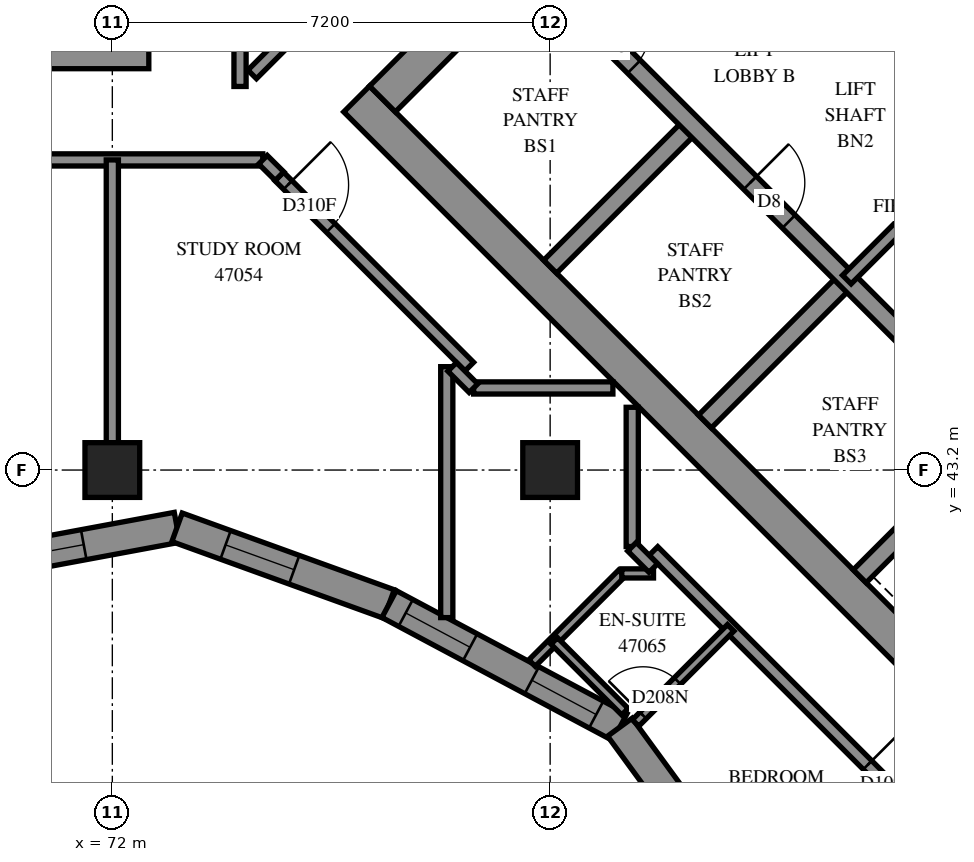
"""IFC4 building model, lengths in metres.
Left out: names, types, materials, properties, quantities, classifications, styles, units other than length and angle.
Written with IfcOpenShell. Run it as: python <this file> out.ifc"""

import sys

from ifc_helpers import new_model, si_unit, direction, frame, frame_2d, origin, origin_2d, place, context, subcontext, project, spatial, polyline, rectangle, outline, extrude, element, fill, save


model = new_model("IFC4")
c1 = context("Model", 3, precision=1e-05, world=origin(), true_north=direction((0.0, 1.0)))
c2 = subcontext(c1, "Body", "Model", "MODEL_VIEW")
j1 = project(units=[si_unit("LENGTHUNIT", "METRE"), si_unit("PLANEANGLEUNIT", "RADIAN")], contexts=[c1])
p1 = place(None, origin())
s1 = spatial("IfcSite", under=j1, at=p1, CompositionType="ELEMENT")
p2 = place(p1, origin())
s2 = spatial("IfcBuilding", under=s1, at=p2, CompositionType="ELEMENT")
p3 = place(p2, frame((0.0, 0.0, 172.8)))
s3 = spatial("IfcBuildingStorey", under=s2, at=p3, CompositionType="ELEMENT", Elevation=172.8)
for number, where, z_axis, x_axis in (
    (1, (72.0, 43.2, 0.0), (0.0, 0.0, 1.0), (1.0, 0.0, 0.0)),
    (2, (79.2, 43.2, 0.0), (0.0, 0.0, 1.0), (1.0, 0.0, 0.0)),
):
    element("IfcColumn", number, at=place(p3, frame(where, z_axis=z_axis, x_axis=x_axis)), inside=s3, PredefinedType="COLUMN", context=c2, shape_type="SweptSolid", body=[
        extrude(rectangle(XDim=0.9, YDim=0.9, at=origin_2d()), origin(), (0.0, 0.0, 1.0), 3.1),
    ])
for number, where, z_axis, x_axis in (
    (3, (57.0, 50.1, -0.3), (0.0, 0.0, 1.0), (1.0, 0.0, 0.0)),
    (4, (76.018, 49.302, -0.3), (0.0, 0.0, 1.0), (0.707, -0.707, 0.0)),
):
    element("IfcWall", number, at=place(p3, frame(where, z_axis=z_axis, x_axis=x_axis)), inside=s3, PredefinedType="SHEAR", context=c2, shape_type="SweptSolid", body=[
        extrude(rectangle(XDim=15.6, YDim=0.6, at=frame_2d((7.8, 0.0))), origin(), (0.0, 0.0, 1.0), 2.7),
    ])
p4 = place(p3, frame((76.442, 49.302, -0.3), z_axis=(0.0, 0.0, 1.0), x_axis=(0.7071067812, 0.7071067812, 0.0)))
e5 = element("IfcWall", 5, at=p4, inside=s3, PredefinedType="SHEAR", context=c2, shape_type="SweptSolid", body=[
    extrude(rectangle(XDim=14.4, YDim=0.6, at=frame_2d((7.2, 0.0))), origin(), (0.0, 0.0, 1.0), 2.7),
])
p5 = place(p4, frame((4.55, 0.0, 0.3)))
e6 = element("IfcOpeningElement", 6, at=p5, cuts=e5, PredefinedType="OPENING", context=c2, shape_type="SweptSolid", body=[
    extrude(rectangle(XDim=1.1, YDim=2.1, at=frame_2d((0.55, 1.05))), frame((0.0, 0.31, 0.0), z_axis=(0.0, -1.0, 0.0), x_axis=(1.0, 0.0, 0.0)), (0.0, 0.0, 1.0), 0.62),
])
p6 = place(p4, frame((11.35, 0.0, 0.3)))
e7 = element("IfcOpeningElement", 7, at=p6, cuts=e5, PredefinedType="OPENING", context=c2, shape_type="SweptSolid", body=[
    extrude(rectangle(XDim=1.1, YDim=2.1, at=frame_2d((0.55, 1.05))), frame((0.0, 0.31, 0.0), z_axis=(0.0, -1.0, 0.0), x_axis=(1.0, 0.0, 0.0)), (0.0, 0.0, 1.0), 0.62),
])
p7 = place(p3, frame((79.2, 46.544, 0.0), z_axis=(0.0, 0.0, 1.0), x_axis=(0.7071219326, 0.7070916295, 0.0)))
e8 = element("IfcWall", 8, at=p7, inside=s3, PredefinedType="SOLIDWALL", context=c2, shape_type="SweptSolid", body=[
    extrude(rectangle(XDim=3.3, YDim=0.3, at=frame_2d((1.65, 0.0))), origin(), (0.0, 0.0, 1.0), 3.1),
])
for number, where, z_axis, x_axis in (
    (9, (81.746, 43.999, 0.0), (0.0, 0.0, 1.0), (0.707, 0.707, 0.0)),
    (10, (84.291, 41.453, 0.0), (0.0, 0.0, 1.0), (0.707, 0.707, 0.0)),
):
    element("IfcWall", number, at=place(p3, frame(where, z_axis=z_axis, x_axis=x_axis)), inside=s3, PredefinedType="SOLIDWALL", context=c2, shape_type="SweptSolid", body=[
        extrude(rectangle(XDim=3.3, YDim=0.3, at=frame_2d((1.65, 0.0))), origin(), (0.0, 0.0, 1.0), 3.1),
    ])
p8 = place(p3, frame((78.988, 51.423, 0.0), z_axis=(0.0, 0.0, 1.0), x_axis=(0.7071067812, -0.7071067812, 0.0)))
e11 = element("IfcWall", 11, at=p8, inside=s3, PredefinedType="SOLIDWALL", context=c2, shape_type="SweptSolid", body=[
    extrude(rectangle(XDim=14.4, YDim=0.3, at=frame_2d((7.2, 0.0))), origin(), (0.0, 0.0, 1.0), 3.1),
])
p9 = place(p8, frame((1.35, 0.0, 0.0)))
e12 = element("IfcOpeningElement", 12, at=p9, cuts=e11, PredefinedType="OPENING", context=c2, shape_type="SweptSolid", body=[
    extrude(rectangle(XDim=0.9, YDim=2.1, at=frame_2d((0.45, 1.05))), frame((0.0, 0.16, 0.0), z_axis=(0.0, -1.0, 0.0), x_axis=(1.0, 0.0, 0.0)), (0.0, 0.0, 1.0), 0.32),
])
p10 = place(p8, frame((4.95, 0.0, 0.0)))
e13 = element("IfcOpeningElement", 13, at=p10, cuts=e11, PredefinedType="OPENING", context=c2, shape_type="SweptSolid", body=[
    extrude(rectangle(XDim=0.9, YDim=2.1, at=frame_2d((0.45, 1.05))), frame((0.0, 0.16, 0.0), z_axis=(0.0, -1.0, 0.0), x_axis=(1.0, 0.0, 0.0)), (0.0, 0.0, 1.0), 0.32),
])
p11 = place(p8, frame((8.55, 0.0, 0.0)))
e14 = element("IfcOpeningElement", 14, at=p11, cuts=e11, PredefinedType="OPENING", context=c2, shape_type="SweptSolid", body=[
    extrude(rectangle(XDim=0.9, YDim=2.1, at=frame_2d((0.45, 1.05))), frame((0.0, 0.16, 0.0), z_axis=(0.0, -1.0, 0.0), x_axis=(1.0, 0.0, 0.0)), (0.0, 0.0, 1.0), 0.32),
])
p12 = place(p8, frame((12.05, 0.0, 0.0)))
e15 = element("IfcOpeningElement", 15, at=p12, cuts=e11, PredefinedType="OPENING", context=c2, shape_type="SweptSolid", body=[
    extrude(rectangle(XDim=1.1, YDim=2.1, at=frame_2d((0.55, 1.05))), frame((0.0, 0.16, 0.0), z_axis=(0.0, -1.0, 0.0), x_axis=(1.0, 0.0, 0.0)), (0.0, 0.0, 1.0), 0.32),
])
p13 = place(p3, frame((81.534, 53.969, 0.0), z_axis=(0.0, 0.0, 1.0), x_axis=(0.707103309, -0.7071102534, 0.0)))
e16 = element("IfcWall", 16, at=p13, inside=s3, PredefinedType="SOLIDWALL", context=c2, shape_type="SweptSolid", body=[
    extrude(rectangle(XDim=14.4, YDim=0.3, at=frame_2d((7.2, 0.0))), origin(), (0.0, 0.0, 1.0), 3.1),
])
p14 = place(p13, frame((1.25, 0.0, 0.0)))
e17 = element("IfcOpeningElement", 17, at=p14, cuts=e16, PredefinedType="OPENING", context=c2, shape_type="SweptSolid", body=[
    extrude(rectangle(XDim=1.1, YDim=2.1, at=frame_2d((0.55, 1.05))), frame((0.0, 0.16, 0.0), z_axis=(0.0, -1.0, 0.0), x_axis=(1.0, 0.0, 0.0)), (0.0, 0.0, 1.0), 0.32),
])
p15 = place(p13, frame((4.85, 0.0, 0.0)))
e18 = element("IfcOpeningElement", 18, at=p15, cuts=e16, PredefinedType="OPENING", context=c2, shape_type="SweptSolid", body=[
    extrude(rectangle(XDim=1.1, YDim=2.1, at=frame_2d((0.55, 1.05))), frame((0.0, 0.16, 0.0), z_axis=(0.0, -1.0, 0.0), x_axis=(1.0, 0.0, 0.0)), (0.0, 0.0, 1.0), 0.32),
])
p16 = place(p13, frame((8.45, 0.0, 0.0)))
e19 = element("IfcOpeningElement", 19, at=p16, cuts=e16, PredefinedType="OPENING", context=c2, shape_type="SweptSolid", body=[
    extrude(rectangle(XDim=1.1, YDim=2.1, at=frame_2d((0.55, 1.05))), frame((0.0, 0.16, 0.0), z_axis=(0.0, -1.0, 0.0), x_axis=(1.0, 0.0, 0.0)), (0.0, 0.0, 1.0), 0.32),
])
p17 = place(p13, frame((12.05, 0.0, 0.0)))
e20 = element("IfcOpeningElement", 20, at=p17, cuts=e16, PredefinedType="OPENING", context=c2, shape_type="SweptSolid", body=[
    extrude(rectangle(XDim=1.1, YDim=2.1, at=frame_2d((0.55, 1.05))), frame((0.0, 0.16, 0.0), z_axis=(0.0, -1.0, 0.0), x_axis=(1.0, 0.0, 0.0)), (0.0, 0.0, 1.0), 0.32),
])
p18 = place(p3, frame((69.637, 41.621, 0.0), z_axis=(0.0, 0.0, 1.0), x_axis=(0.9831680568, 0.1827035087, 0.0)))
e21 = element("IfcWall", 21, at=p18, inside=s3, PredefinedType="SOLIDWALL", context=c2, shape_type="SweptSolid", body=[
    extrude(outline(polyline([(-0.046, -0.25), (3.418, -0.25), (3.554, 0.25), (0.046, 0.25), (-0.046, -0.25)])), origin(), (0.0, 0.0, 1.0), 3.1),
])
p19 = place(p18, frame((0.725, 0.0, 0.45)))
e22 = element("IfcOpeningElement", 22, at=p19, cuts=e21, PredefinedType="OPENING", context=c2, shape_type="SweptSolid", body=[
    extrude(rectangle(XDim=1.2, YDim=2.5, at=frame_2d((0.6, 1.25))), frame((0.0, 0.26, 0.0), z_axis=(0.0, -1.0, 0.0), x_axis=(1.0, 0.0, 0.0)), (0.0, 0.0, 1.0), 0.52),
])
p20 = place(p3, frame((73.064, 42.258, 0.0), z_axis=(0.0, 0.0, 1.0), x_axis=(0.9402915947, -0.3403699707, 0.0)))
e23 = element("IfcWall", 23, at=p20, inside=s3, PredefinedType="SOLIDWALL", context=c2, shape_type="SweptSolid", body=[
    extrude(outline(polyline([(0.068, -0.25), (3.691, -0.25), (3.726, 0.25), (-0.068, 0.25), (0.068, -0.25)])), origin(), (0.0, 0.0, 1.0), 3.1),
])
p21 = place(p20, frame((0.848, 0.0, 0.45)))
e24 = element("IfcOpeningElement", 24, at=p21, cuts=e23, PredefinedType="OPENING", context=c2, shape_type="SweptSolid", body=[
    extrude(rectangle(XDim=1.2, YDim=2.5, at=frame_2d((0.6, 1.25))), frame((0.0, 0.26, 0.0), z_axis=(0.0, -1.0, 0.0), x_axis=(1.0, 0.0, 0.0)), (0.0, 0.0, 1.0), 0.52),
])
p22 = place(p3, frame((76.551, 40.996, 0.0), z_axis=(0.0, 0.0, 1.0), x_axis=(0.8822905093, -0.4707052763, 0.0)))
e25 = element("IfcWall", 25, at=p22, inside=s3, PredefinedType="SOLIDWALL", context=c2, shape_type="SweptSolid", body=[
    extrude(outline(polyline([(0.018, -0.25), (4.244, -0.25), (4.359, 0.25), (-0.018, 0.25), (0.018, -0.25)])), origin(), (0.0, 0.0, 1.0), 3.1),
])
p23 = place(p22, frame((0.31, 0.0, 0.45)))
e26 = element("IfcOpeningElement", 26, at=p23, cuts=e25, PredefinedType="OPENING", context=c2, shape_type="SweptSolid", body=[
    extrude(rectangle(XDim=1.2, YDim=2.5, at=frame_2d((0.6, 1.25))), frame((0.0, 0.26, 0.0), z_axis=(0.0, -1.0, 0.0), x_axis=(1.0, 0.0, 0.0)), (0.0, 0.0, 1.0), 0.52),
])
p24 = place(p22, frame((2.661, 0.0, 0.45)))
e27 = element("IfcOpeningElement", 27, at=p24, cuts=e25, PredefinedType="OPENING", context=c2, shape_type="SweptSolid", body=[
    extrude(rectangle(XDim=1.2, YDim=2.5, at=frame_2d((0.6, 1.25))), frame((0.0, 0.26, 0.0), z_axis=(0.0, -1.0, 0.0), x_axis=(1.0, 0.0, 0.0)), (0.0, 0.0, 1.0), 0.52),
])
p25 = place(p3, frame((80.346, 38.971, 0.0), z_axis=(0.0, 0.0, 1.0), x_axis=(0.5898152736, -0.8075381991, 0.0)))
e28 = element("IfcWall", 28, at=p25, inside=s3, PredefinedType="SOLIDWALL", context=c2, shape_type="SweptSolid", body=[
    extrude(outline(polyline([(0.057, -0.25), (4.149, -0.25), (4.071, 0.25), (-0.057, 0.25), (0.057, -0.25)])), origin(), (0.0, 0.0, 1.0), 3.1),
])
p26 = place(p25, frame((1.859, 0.0, 0.45)))
e29 = element("IfcOpeningElement", 29, at=p26, cuts=e28, PredefinedType="OPENING", context=c2, shape_type="SweptSolid", body=[
    extrude(rectangle(XDim=1.2, YDim=2.5, at=frame_2d((0.6, 1.25))), frame((0.0, 0.26, 0.0), z_axis=(0.0, -1.0, 0.0), x_axis=(1.0, 0.0, 0.0)), (0.0, 0.0, 1.0), 0.52),
])
p27 = place(p3, frame((84.079, 46.332, 0.0), z_axis=(0.0, 0.0, 1.0), x_axis=(0.7071067812, 0.7071067812, 0.0)))
e30 = element("IfcWall", 30, at=p27, inside=s3, PredefinedType="PARTITIONING", context=c2, shape_type="SweptSolid", body=[
    extrude(rectangle(XDim=3.6, YDim=0.2, at=frame_2d((1.8, 0.0))), origin(), (0.0, 0.0, 1.0), 3.1),
])
p28 = place(p3, frame((55.5, 48.3, 0.0), z_axis=(0.0, 0.0, 1.0), x_axis=(1.0, 0.0, 0.0)))
e31 = element("IfcWall", 31, at=p28, inside=s3, PredefinedType="PARTITIONING", context=c2, shape_type="SweptSolid", body=[
    extrude(rectangle(XDim=18.974, YDim=0.2, at=frame_2d((9.487, 0.0))), origin(), (0.0, 0.0, 1.0), 3.1),
])
p29 = place(p28, frame((5.963, 0.0, 0.0)))
e32 = element("IfcOpeningElement", 32, at=p29, cuts=e31, PredefinedType="OPENING", context=c2, shape_type="SweptSolid", body=[
    extrude(rectangle(XDim=1.0, YDim=2.1, at=frame_2d((0.5, 1.05))), frame((0.0, 0.11, 0.0), z_axis=(0.0, -1.0, 0.0), x_axis=(1.0, 0.0, 0.0)), (0.0, 0.0, 1.0), 0.22),
])
p30 = place(p28, frame((13.161, 0.0, 0.0)))
e33 = element("IfcOpeningElement", 33, at=p30, cuts=e31, PredefinedType="OPENING", context=c2, shape_type="SweptSolid", body=[
    extrude(rectangle(XDim=0.9, YDim=2.1, at=frame_2d((0.45, 1.05))), frame((0.0, 0.11, 0.0), z_axis=(0.0, -1.0, 0.0), x_axis=(1.0, 0.0, 0.0)), (0.0, 0.0, 1.0), 0.22),
])
p31 = place(p3, frame((80.899, 41.869, 0.0), z_axis=(0.0, 0.0, 1.0), x_axis=(0.7071067812, -0.7071067812, 0.0)))
e34 = element("IfcWall", 34, at=p31, inside=s3, PredefinedType="PARTITIONING", context=c2, shape_type="SweptSolid", body=[
    extrude(rectangle(XDim=8.392, YDim=0.2, at=frame_2d((4.196, 0.0))), origin(), (0.0, 0.0, 1.0), 3.1),
])
p32 = place(p31, frame((4.979, 0.0, 0.0)))
e35 = element("IfcOpeningElement", 35, at=p32, cuts=e34, PredefinedType="OPENING", context=c2, shape_type="SweptSolid", body=[
    extrude(rectangle(XDim=0.9, YDim=2.1, at=frame_2d((0.45, 1.05))), frame((0.0, 0.11, 0.0), z_axis=(0.0, -1.0, 0.0), x_axis=(1.0, 0.0, 0.0)), (0.0, 0.0, 1.0), 0.22),
])
p33 = place(p3, frame((72.0, 43.65, 0.0), z_axis=(0.0, 0.0, 1.0), x_axis=(0.0, 1.0, 0.0)))
e36 = element("IfcWall", 36, at=p33, inside=s3, PredefinedType="PARTITIONING", context=c2, shape_type="SweptSolid", body=[
    extrude(rectangle(XDim=4.65, YDim=0.2, at=frame_2d((2.325, 0.0))), origin(), (0.0, 0.0, 1.0), 3.1),
])
p34 = place(p3, frame((74.3, 49.706, 0.0), z_axis=(0.0, 0.0, 1.0), x_axis=(0.7071067812, 0.7071067812, 0.0)))
e37 = element("IfcWall", 37, at=p34, inside=s3, PredefinedType="PARTITIONING", context=c2, shape_type="SweptSolid", body=[
    extrude(rectangle(XDim=4.588, YDim=0.2, at=frame_2d((2.294, 0.0))), origin(), (0.0, 0.0, 1.0), 3.1),
])
p35 = place(p3, frame((74.745, 48.029, 0.0), z_axis=(0.0, 0.0, 1.0), x_axis=(0.7068806156, -0.7073328745, 0.0)))
e38 = element("IfcWall", 38, at=p35, inside=s3, PredefinedType="PARTITIONING", context=c2, shape_type="SweptSolid", body=[
    extrude(rectangle(XDim=4.422, YDim=0.2, at=frame_2d((2.211, 0.0))), origin(), (0.0, 0.0, 1.0), 3.1),
])
p36 = place(p35, frame((0.199, 0.0, 0.0)))
e39 = element("IfcOpeningElement", 39, at=p36, cuts=e38, PredefinedType="OPENING", context=c2, shape_type="SweptSolid", body=[
    extrude(rectangle(XDim=1.0, YDim=2.1, at=frame_2d((0.5, 1.05))), frame((0.0, 0.11, 0.0), z_axis=(0.0, -1.0, 0.0), x_axis=(1.0, 0.0, 0.0)), (0.0, 0.0, 1.0), 0.22),
])
p37 = place(p3, frame((77.5, 40.773, 0.0), z_axis=(0.0, 0.0, 1.0), x_axis=(0.0, 1.0, 0.0)))
e40 = element("IfcWall", 40, at=p37, inside=s3, PredefinedType="PARTITIONING", context=c2, shape_type="SweptSolid", body=[
    extrude(rectangle(XDim=4.127, YDim=0.2, at=frame_2d((2.063, 0.0))), origin(), (0.0, 0.0, 1.0), 3.1),
])
p38 = place(p3, frame((74.1, 49.508, 0.0), z_axis=(0.0, 0.0, 1.0), x_axis=(0.0, 1.0, 0.0)))
e41 = element("IfcWall", 41, at=p38, inside=s3, PredefinedType="PARTITIONING", context=c2, shape_type="SweptSolid", body=[
    extrude(rectangle(XDim=3.442, YDim=0.2, at=frame_2d((1.721, 0.0))), origin(), (0.0, 0.0, 1.0), 3.1),
])
for number, where, z_axis, x_axis in (
    (42, (77.942, 44.55, 0.0), (0.0, 0.0, 1.0), (1.0, 0.0, 0.0)),
    (43, (80.55, 41.942, 0.0), (0.0, 0.0, 1.0), (0.0, 1.0, 0.0)),
):
    element("IfcWall", number, at=place(p3, frame(where, z_axis=z_axis, x_axis=x_axis)), inside=s3, PredefinedType="PARTITIONING", context=c2, shape_type="SweptSolid", body=[
        extrude(rectangle(XDim=2.29, YDim=0.2, at=frame_2d((1.145, 0.0))), origin(), (0.0, 0.0, 1.0), 3.1),
    ])
p39 = place(p3, frame((80.605, 39.041, 0.0), z_axis=(0.0, 0.0, 1.0), x_axis=(0.7071293873, 0.7070841744, 0.0)))
e44 = element("IfcWall", 44, at=p39, inside=s3, PredefinedType="PARTITIONING", context=c2, shape_type="SweptSolid", body=[
    extrude(rectangle(XDim=2.212, YDim=0.15, at=frame_2d((1.106, 0.0))), origin(), (0.0, 0.0, 1.0), 3.1),
])
p40 = place(p39, frame((0.175, 0.0, 0.0)))
e45 = element("IfcOpeningElement", 45, at=p40, cuts=e44, PredefinedType="OPENING", context=c2, shape_type="SweptSolid", body=[
    extrude(rectangle(XDim=0.8, YDim=2.1, at=frame_2d((0.4, 1.05))), frame((0.0, 0.085, 0.0), z_axis=(0.0, -1.0, 0.0), x_axis=(1.0, 0.0, 0.0)), (0.0, 0.0, 1.0), 0.17),
])
p41 = place(p3, frame((78.902, 40.025, 0.0), z_axis=(0.0, 0.0, 1.0), x_axis=(0.7071307448, 0.7070828167, 0.0)))
e46 = element("IfcWall", 46, at=p41, inside=s3, PredefinedType="PARTITIONING", context=c2, shape_type="SweptSolid", body=[
    extrude(rectangle(XDim=2.087, YDim=0.15, at=frame_2d((1.043, 0.0))), origin(), (0.0, 0.0, 1.0), 3.1),
])
p42 = place(p3, frame((79.267, 40.389, 0.0), z_axis=(0.0, 0.0, 1.0), x_axis=(0.7071067812, -0.7071067812, 0.0)))
e47 = element("IfcWall", 47, at=p42, inside=s3, PredefinedType="PARTITIONING", context=c2, shape_type="SweptSolid", body=[
    extrude(rectangle(XDim=1.644, YDim=0.15, at=frame_2d((0.822, 0.0))), origin(), (0.0, 0.0, 1.0), 3.1),
])
p43 = place(p3, frame((80.378, 41.5, 0.0), z_axis=(0.0, 0.0, 1.0), x_axis=(1.0, 0.0, 0.0)))
e48 = element("IfcWall", 48, at=p43, inside=s3, PredefinedType="PARTITIONING", context=c2, shape_type="SweptSolid", body=[
    extrude(rectangle(XDim=0.522, YDim=0.15, at=frame_2d((0.261, 0.0))), origin(), (0.0, 0.0, 1.0), 3.1),
])
for number, where, z_axis, x_axis in (
    (49, (77.588, 44.897, 0.0), (0.0, 0.0, 1.0), (0.707, -0.707, 0.0)),
    (50, (80.546, 41.938, 0.0), (0.0, 0.0, 1.0), (0.707, -0.707, 0.0)),
):
    element("IfcWall", number, at=place(p3, frame(where, z_axis=z_axis, x_axis=x_axis)), inside=s3, PredefinedType="PARTITIONING", context=c2, shape_type="SweptSolid", body=[
        extrude(rectangle(XDim=0.495, YDim=0.2, at=frame_2d((0.247, 0.0))), origin(), (0.0, 0.0, 1.0), 3.1),
    ])
p44 = place(p3, frame((74.477, 48.303, 0.0), z_axis=(0.0, 0.0, 1.0), x_axis=(0.7097111995, -0.7044927348, 0.0)))
e51 = element("IfcWall", 51, at=p44, inside=s3, PredefinedType="PARTITIONING", context=c2, shape_type="SweptSolid", body=[
    extrude(rectangle(XDim=0.383, YDim=0.2, at=frame_2d((0.192, 0.0))), origin(), (0.0, 0.0, 1.0), 3.1),
])
p45 = place(p19, origin())
e52 = element("IfcWindow", 52, at=p45, inside=s3, PartitioningType="SINGLE_PANEL", PredefinedType="WINDOW", context=c2, shape_type="SweptSolid", body=[
    extrude(rectangle(XDim=1.2, YDim=2.5, at=frame_2d((0.6, 1.25))), frame((0.0, 0.18, 0.0), z_axis=(0.0, -1.0, 0.0), x_axis=(1.0, 0.0, 0.0)), (0.0, 0.0, 1.0), 0.06),
])
fill(e22, e52)
p46 = place(p21, origin())
e53 = element("IfcWindow", 53, at=p46, inside=s3, PartitioningType="SINGLE_PANEL", PredefinedType="WINDOW", context=c2, shape_type="SweptSolid", body=[
    extrude(rectangle(XDim=1.2, YDim=2.5, at=frame_2d((0.6, 1.25))), frame((0.0, 0.18, 0.0), z_axis=(0.0, -1.0, 0.0), x_axis=(1.0, 0.0, 0.0)), (0.0, 0.0, 1.0), 0.06),
])
fill(e24, e53)
p47 = place(p23, origin())
e54 = element("IfcWindow", 54, at=p47, inside=s3, PartitioningType="SINGLE_PANEL", PredefinedType="WINDOW", context=c2, shape_type="SweptSolid", body=[
    extrude(rectangle(XDim=1.2, YDim=2.5, at=frame_2d((0.6, 1.25))), frame((0.0, 0.17, 0.0), z_axis=(0.0, -1.0, 0.0), x_axis=(1.0, 0.0, 0.0)), (0.0, 0.0, 1.0), 0.06),
])
fill(e26, e54)
p48 = place(p24, origin())
e55 = element("IfcWindow", 55, at=p48, inside=s3, PartitioningType="SINGLE_PANEL", PredefinedType="WINDOW", context=c2, shape_type="SweptSolid", body=[
    extrude(rectangle(XDim=1.2, YDim=2.5, at=frame_2d((0.6, 1.25))), frame((0.0, 0.18, 0.0), z_axis=(0.0, -1.0, 0.0), x_axis=(1.0, 0.0, 0.0)), (0.0, 0.0, 1.0), 0.06),
])
fill(e27, e55)
p49 = place(p9, origin())
e56 = element("IfcDoor", 56, at=p49, inside=s3, OperationType="SINGLE_SWING_LEFT", PredefinedType="DOOR", context=c2, shape_type="SweptSolid", body=[
    extrude(rectangle(XDim=0.9, YDim=2.1, at=frame_2d((0.45, 1.05))), frame((0.0, 0.025, 0.0), z_axis=(0.0, -1.0, 0.0), x_axis=(1.0, 0.0, 0.0)), (0.0, 0.0, 1.0), 0.05),
])
fill(e12, e56)
p50 = place(p10, origin())
e57 = element("IfcDoor", 57, at=p50, inside=s3, OperationType="SINGLE_SWING_LEFT", PredefinedType="DOOR", context=c2, shape_type="SweptSolid", body=[
    extrude(rectangle(XDim=0.9, YDim=2.1, at=frame_2d((0.45, 1.05))), frame((0.0, 0.025, 0.0), z_axis=(0.0, -1.0, 0.0), x_axis=(1.0, 0.0, 0.0)), (0.0, 0.0, 1.0), 0.05),
])
fill(e13, e57)
p51 = place(p36, origin())
e58 = element("IfcDoor", 58, at=p51, inside=s3, OperationType="SINGLE_SWING_LEFT", PredefinedType="DOOR", context=c2, shape_type="SweptSolid", body=[
    extrude(rectangle(XDim=1.0, YDim=2.1, at=frame_2d((0.5, 1.05))), frame((0.0, 0.025, 0.0), z_axis=(0.0, -1.0, 0.0), x_axis=(1.0, 0.0, 0.0)), (0.0, 0.0, 1.0), 0.05),
])
fill(e39, e58)
p52 = place(p32, origin())
e59 = element("IfcDoor", 59, at=p52, inside=s3, OperationType="SINGLE_SWING_RIGHT", PredefinedType="DOOR", context=c2, shape_type="SweptSolid", body=[
    extrude(rectangle(XDim=0.9, YDim=2.1, at=frame_2d((0.45, 1.05))), frame((0.0, 0.025, 0.0), z_axis=(0.0, -1.0, 0.0), x_axis=(1.0, 0.0, 0.0)), (0.0, 0.0, 1.0), 0.05),
])
fill(e35, e59)
p53 = place(p40, origin())
e60 = element("IfcDoor", 60, at=p53, inside=s3, OperationType="SINGLE_SWING_RIGHT", PredefinedType="DOOR", context=c2, shape_type="SweptSolid", body=[
    extrude(rectangle(XDim=0.8, YDim=2.1, at=frame_2d((0.4, 1.05))), frame((0.0, 0.025, 0.0), z_axis=(0.0, -1.0, 0.0), x_axis=(1.0, 0.0, 0.0)), (0.0, 0.0, 1.0), 0.05),
])
fill(e45, e60)
save(model, sys.argv[1])
